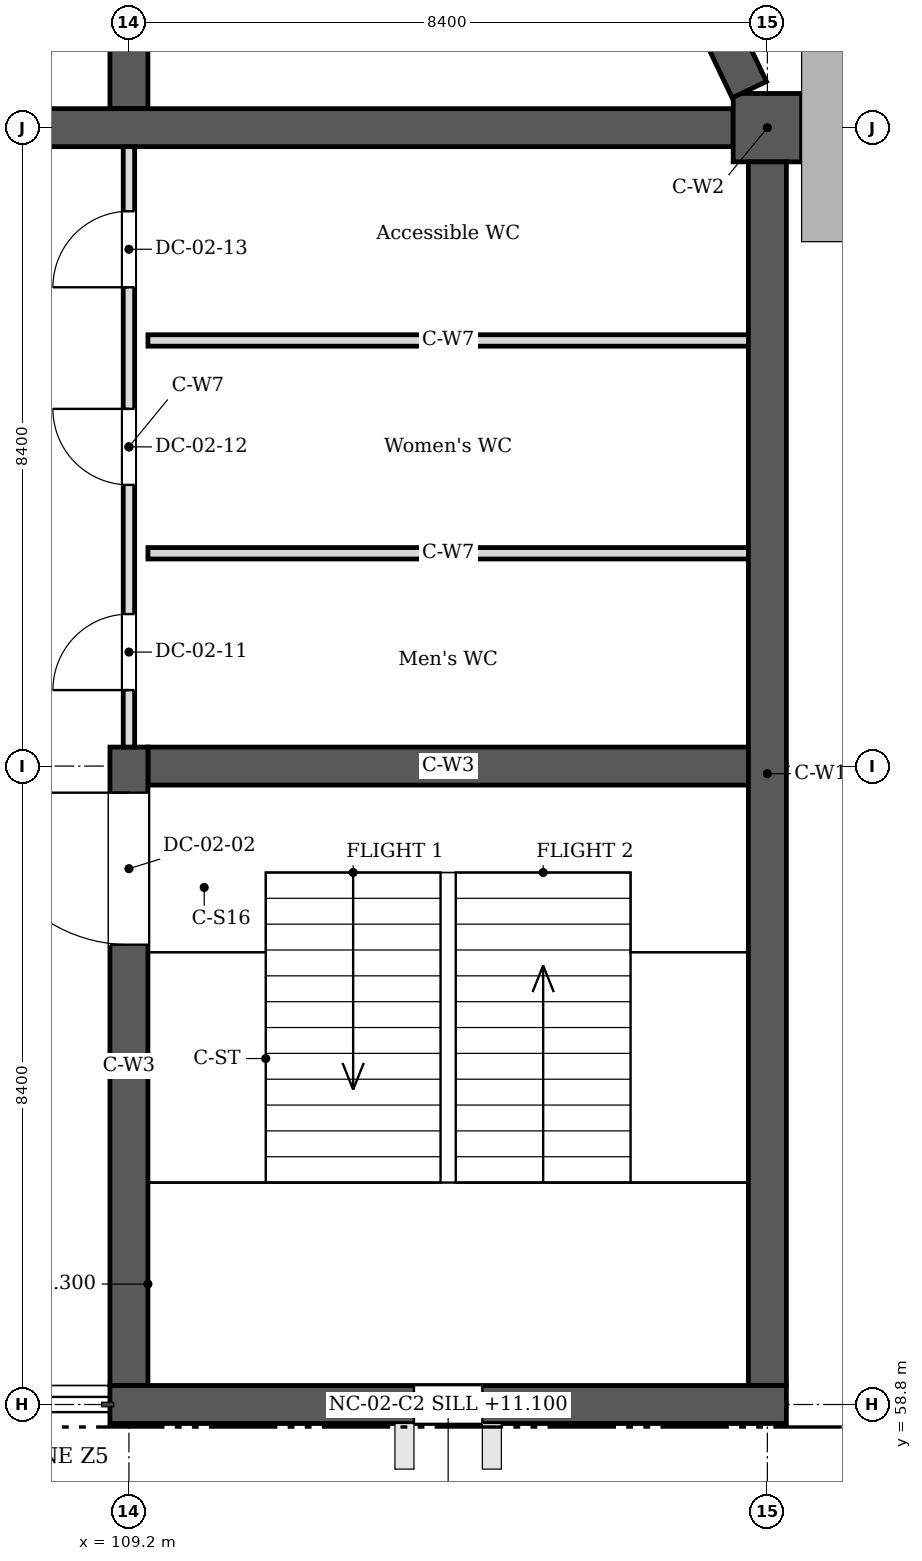
"""IFC4 building model, lengths in metres.
Left out: names, types, materials, properties, quantities, classifications, styles, units other than length and angle.
Written with IfcOpenShell. Run it as: python <this file> out.ifc"""

import sys

from ifc_helpers import new_model, si_unit, direction, frame, frame_2d, origin, place, context, subcontext, project, spatial, rectangle, extrude, element, fill, save


model = new_model("IFC4")
c1 = context("Model", 3, precision=1e-05, world=origin(), true_north=direction((0.0, 1.0)))
c2 = subcontext(c1, "Body", "Model", "MODEL_VIEW")
j1 = project(units=[si_unit("LENGTHUNIT", "METRE"), si_unit("PLANEANGLEUNIT", "RADIAN")], contexts=[c1])
p1 = place(None, origin())
s1 = spatial("IfcSite", under=j1, at=p1, CompositionType="ELEMENT")
p2 = place(p1, origin())
s2 = spatial("IfcBuilding", under=s1, at=p2, CompositionType="ELEMENT")
p3 = place(p2, frame((0.0, 0.0, 10.2)))
s3 = spatial("IfcBuildingStorey", under=s2, at=p3, CompositionType="ELEMENT", Elevation=10.2)
p4 = place(p3, frame((117.85, 58.8, 0.0), z_axis=(0.0, 0.0, 1.0), x_axis=(-1.0, 0.0, 0.0)))
e1 = element("IfcWall", 1, at=p4, inside=s3, PredefinedType="SOLIDWALL", context=c2, shape_type="SweptSolid", body=[
    extrude(rectangle(XDim=8.9, YDim=0.5, at=frame_2d((4.45, 0.0))), origin(), (0.0, 0.0, 1.0), 4.2),
])
p5 = place(p4, frame((4.0, 0.0, 0.9)))
e2 = element("IfcOpeningElement", 2, at=p5, cuts=e1, PredefinedType="OPENING", context=c2, shape_type="SweptSolid", body=[
    extrude(rectangle(XDim=0.9, YDim=2.4, at=frame_2d((0.45, 1.2))), frame((0.0, 0.26, 0.0), z_axis=(0.0, -1.0, 0.0), x_axis=(1.0, 0.0, 0.0)), (0.0, 0.0, 1.0), 0.52),
])
p6 = place(p3, frame((117.6, 75.15, 0.0), z_axis=(0.0, 0.0, 1.0), x_axis=(0.0, -1.0, 0.0)))
e3 = element("IfcWall", 3, at=p6, inside=s3, PredefinedType="SOLIDWALL", context=c2, shape_type="SweptSolid", body=[
    extrude(rectangle(XDim=16.1, YDim=0.5, at=frame_2d((8.05, 0.0))), origin(), (0.0, 0.0, 1.0), 4.2),
])
p7 = place(p3, frame((113.666, 83.863, 0.0), z_axis=(0.0, 0.0, 1.0), x_axis=(0.429922557701, -0.902865767642, 0.0)))
e4 = element("IfcWall", 4, at=p7, inside=s3, PredefinedType="SOLIDWALL", context=c2, shape_type="SweptSolid", body=[
    extrude(rectangle(XDim=8.598, YDim=0.5, at=frame_2d((4.299, 0.0))), origin(), (0.0, 0.0, 1.0), 4.2),
])
p8 = place(p7, frame((5.012, 0.0, 0.3)))
e5 = element("IfcOpeningElement", 5, at=p8, cuts=e4, PredefinedType="OPENING", context=c2, shape_type="SweptSolid", body=[
    extrude(rectangle(XDim=1.8, YDim=3.6, at=frame_2d((0.9, 1.8))), frame((0.0, 0.26, 0.0), z_axis=(0.0, -1.0, 0.0), x_axis=(1.0, 0.0, 0.0)), (0.0, 0.0, 1.0), 0.52),
])
p9 = place(p7, frame((2.188, 0.0, 0.3)))
e6 = element("IfcOpeningElement", 6, at=p9, cuts=e4, PredefinedType="OPENING", context=c2, shape_type="SweptSolid", body=[
    extrude(rectangle(XDim=1.8, YDim=3.6, at=frame_2d((0.9, 1.8))), frame((0.0, 0.26, 0.0), z_axis=(0.0, -1.0, 0.0), x_axis=(1.0, 0.0, 0.0)), (0.0, 0.0, 1.0), 0.52),
])
p10 = place(p3, frame((117.6, 75.15, 0.0), z_axis=(0.0, 0.0, 1.0), x_axis=(0.0, 1.0, 0.0)))
e7 = element("IfcWall", 7, at=p10, inside=s3, PredefinedType="SOLIDWALL", context=c2, shape_type="SweptSolid", body=[
    extrude(rectangle(XDim=0.9, YDim=0.9, at=frame_2d((0.45, 0.0))), origin(), (0.0, 0.0, 1.0), 4.2),
])
p11 = place(p3, frame((59.25, 75.6, 0.0), z_axis=(0.0, 0.0, 1.0), x_axis=(1.0, 0.0, 0.0)))
e8 = element("IfcWall", 8, at=p11, inside=s3, PredefinedType="SOLIDWALL", context=c2, shape_type="SweptSolid", body=[
    extrude(rectangle(XDim=57.9, YDim=0.5, at=frame_2d((28.95, 0.0))), origin(), (0.0, 0.0, 1.0), 4.2),
])
p12 = place(p11, frame((19.35, 0.0, 0.0)))
e9 = element("IfcOpeningElement", 9, at=p12, cuts=e8, PredefinedType="OPENING", context=c2, shape_type="SweptSolid", body=[
    extrude(rectangle(XDim=2.4, YDim=2.1, at=frame_2d((1.2, 1.05))), frame((0.0, 0.26, 0.0), z_axis=(0.0, -1.0, 0.0), x_axis=(1.0, 0.0, 0.0)), (0.0, 0.0, 1.0), 0.52),
])
p13 = place(p11, frame((36.15, 0.0, 0.0)))
e10 = element("IfcOpeningElement", 10, at=p13, cuts=e8, PredefinedType="OPENING", context=c2, shape_type="SweptSolid", body=[
    extrude(rectangle(XDim=2.4, YDim=2.1, at=frame_2d((1.2, 1.05))), frame((0.0, 0.26, 0.0), z_axis=(0.0, -1.0, 0.0), x_axis=(1.0, 0.0, 0.0)), (0.0, 0.0, 1.0), 0.52),
])
p14 = place(p3, frame((109.2, 117.35, 0.0), z_axis=(0.0, 0.0, 1.0), x_axis=(0.0, -1.0, 0.0)))
e11 = element("IfcWall", 11, at=p14, inside=s3, PredefinedType="SOLIDWALL", context=c2, shape_type="SweptSolid", body=[
    extrude(rectangle(XDim=41.5, YDim=0.5, at=frame_2d((20.75, 0.0))), origin(), (0.0, 0.0, 1.0), 4.2),
])
p15 = place(p14, frame((5.8, 0.0, 0.0)))
e12 = element("IfcOpeningElement", 12, at=p15, cuts=e11, PredefinedType="OPENING", context=c2, shape_type="SweptSolid", body=[
    extrude(rectangle(XDim=2.0, YDim=2.1, at=frame_2d((1.0, 1.05))), frame((0.0, 0.26, 0.0), z_axis=(0.0, -1.0, 0.0), x_axis=(1.0, 0.0, 0.0)), (0.0, 0.0, 1.0), 0.52),
])
p16 = place(p3, frame((109.2, 59.05, 0.0), z_axis=(0.0, 0.0, 1.0), x_axis=(0.0, 1.0, 0.0)))
e13 = element("IfcWall", 13, at=p16, inside=s3, PredefinedType="SOLIDWALL", context=c2, shape_type="SweptSolid", body=[
    extrude(rectangle(XDim=8.4, YDim=0.5, at=frame_2d((4.2, 0.0))), origin(), (0.0, 0.0, 1.0), 4.2),
])
p17 = place(p16, frame((5.8, 0.0, 0.0)))
e14 = element("IfcOpeningElement", 14, at=p17, cuts=e13, PredefinedType="OPENING", context=c2, shape_type="SweptSolid", body=[
    extrude(rectangle(XDim=2.0, YDim=2.1, at=frame_2d((1.0, 1.05))), frame((0.0, 0.26, 0.0), z_axis=(0.0, -1.0, 0.0), x_axis=(1.0, 0.0, 0.0)), (0.0, 0.0, 1.0), 0.52),
])
p18 = place(p3, frame((109.45, 67.2, 0.0), z_axis=(0.0, 0.0, 1.0), x_axis=(1.0, 0.0, 0.0)))
e15 = element("IfcWall", 15, at=p18, inside=s3, PredefinedType="SOLIDWALL", context=c2, shape_type="SweptSolid", body=[
    extrude(rectangle(XDim=7.9, YDim=0.5, at=frame_2d((3.95, 0.0))), origin(), (0.0, 0.0, 1.0), 4.2),
])
p19 = place(p3, frame((109.2, 67.45, 0.0), z_axis=(0.0, 0.0, 1.0), x_axis=(0.0, 1.0, 0.0)))
e16 = element("IfcWall", 16, at=p19, inside=s3, PredefinedType="PARTITIONING", context=c2, shape_type="SweptSolid", body=[
    extrude(rectangle(XDim=7.9, YDim=0.15, at=frame_2d((3.95, 0.0))), origin(), (0.0, 0.0, 1.0), 3.55),
])
p20 = place(p19, frame((0.75, 0.0, 0.0)))
e17 = element("IfcOpeningElement", 17, at=p20, cuts=e16, PredefinedType="OPENING", context=c2, shape_type="SweptSolid", body=[
    extrude(rectangle(XDim=1.0, YDim=2.1, at=frame_2d((0.5, 1.05))), frame((0.0, 0.085, 0.0), z_axis=(0.0, -1.0, 0.0), x_axis=(1.0, 0.0, 0.0)), (0.0, 0.0, 1.0), 0.17),
])
p21 = place(p19, frame((3.45, 0.0, 0.0)))
e18 = element("IfcOpeningElement", 18, at=p21, cuts=e16, PredefinedType="OPENING", context=c2, shape_type="SweptSolid", body=[
    extrude(rectangle(XDim=1.0, YDim=2.1, at=frame_2d((0.5, 1.05))), frame((0.0, 0.085, 0.0), z_axis=(0.0, -1.0, 0.0), x_axis=(1.0, 0.0, 0.0)), (0.0, 0.0, 1.0), 0.17),
])
p22 = place(p19, frame((6.05, 0.0, 0.0)))
e19 = element("IfcOpeningElement", 19, at=p22, cuts=e16, PredefinedType="OPENING", context=c2, shape_type="SweptSolid", body=[
    extrude(rectangle(XDim=1.0, YDim=2.1, at=frame_2d((0.5, 1.05))), frame((0.0, 0.085, 0.0), z_axis=(0.0, -1.0, 0.0), x_axis=(1.0, 0.0, 0.0)), (0.0, 0.0, 1.0), 0.17),
])
for number, where, z_axis, x_axis in (
    (20, (109.45, 70.0, 0.0), (0.0, 0.0, 1.0), (1.0, 0.0, 0.0)),
    (21, (109.45, 72.8, 0.0), (0.0, 0.0, 1.0), (1.0, 0.0, 0.0)),
):
    element("IfcWall", number, at=place(p3, frame(where, z_axis=z_axis, x_axis=x_axis)), inside=s3, PredefinedType="PARTITIONING", context=c2, shape_type="SweptSolid", body=[
        extrude(rectangle(XDim=7.9, YDim=0.15, at=frame_2d((3.95, 0.0))), origin(), (0.0, 0.0, 1.0), 3.55),
    ])
p23 = place(p5, origin())
e22 = element("IfcWindow", 22, at=p23, inside=s3, PartitioningType="SINGLE_PANEL", PredefinedType="WINDOW", context=c2, shape_type="SweptSolid", body=[
    extrude(rectangle(XDim=0.9, YDim=2.4, at=frame_2d((0.45, 1.2))), frame((0.0, 0.03, 0.0), z_axis=(0.0, -1.0, 0.0), x_axis=(1.0, 0.0, 0.0)), (0.0, 0.0, 1.0), 0.06),
])
fill(e2, e22)
p24 = place(p17, origin())
e23 = element("IfcDoor", 23, at=p24, inside=s3, OperationType="DOUBLE_DOOR_DOUBLE_SWING", PredefinedType="DOOR", context=c2, shape_type="SweptSolid", body=[
    extrude(rectangle(XDim=2.0, YDim=2.1, at=frame_2d((1.0, 1.05))), frame((0.0, 0.025, 0.0), z_axis=(0.0, -1.0, 0.0), x_axis=(1.0, 0.0, 0.0)), (0.0, 0.0, 1.0), 0.05),
])
fill(e14, e23)
p25 = place(p20, origin())
e24 = element("IfcDoor", 24, at=p25, inside=s3, OperationType="SINGLE_SWING_LEFT", PredefinedType="DOOR", context=c2, shape_type="SweptSolid", body=[
    extrude(rectangle(XDim=1.0, YDim=2.1, at=frame_2d((0.5, 1.05))), frame((0.0, 0.025, 0.0), z_axis=(0.0, -1.0, 0.0), x_axis=(1.0, 0.0, 0.0)), (0.0, 0.0, 1.0), 0.05),
])
fill(e17, e24)
p26 = place(p21, origin())
e25 = element("IfcDoor", 25, at=p26, inside=s3, OperationType="SINGLE_SWING_LEFT", PredefinedType="DOOR", context=c2, shape_type="SweptSolid", body=[
    extrude(rectangle(XDim=1.0, YDim=2.1, at=frame_2d((0.5, 1.05))), frame((0.0, 0.025, 0.0), z_axis=(0.0, -1.0, 0.0), x_axis=(1.0, 0.0, 0.0)), (0.0, 0.0, 1.0), 0.05),
])
fill(e18, e25)
p27 = place(p22, origin())
e26 = element("IfcDoor", 26, at=p27, inside=s3, OperationType="SINGLE_SWING_LEFT", PredefinedType="DOOR", context=c2, shape_type="SweptSolid", body=[
    extrude(rectangle(XDim=1.0, YDim=2.1, at=frame_2d((0.5, 1.05))), frame((0.0, 0.025, 0.0), z_axis=(0.0, -1.0, 0.0), x_axis=(1.0, 0.0, 0.0)), (0.0, 0.0, 1.0), 0.05),
])
fill(e19, e26)
save(model, sys.argv[1])
